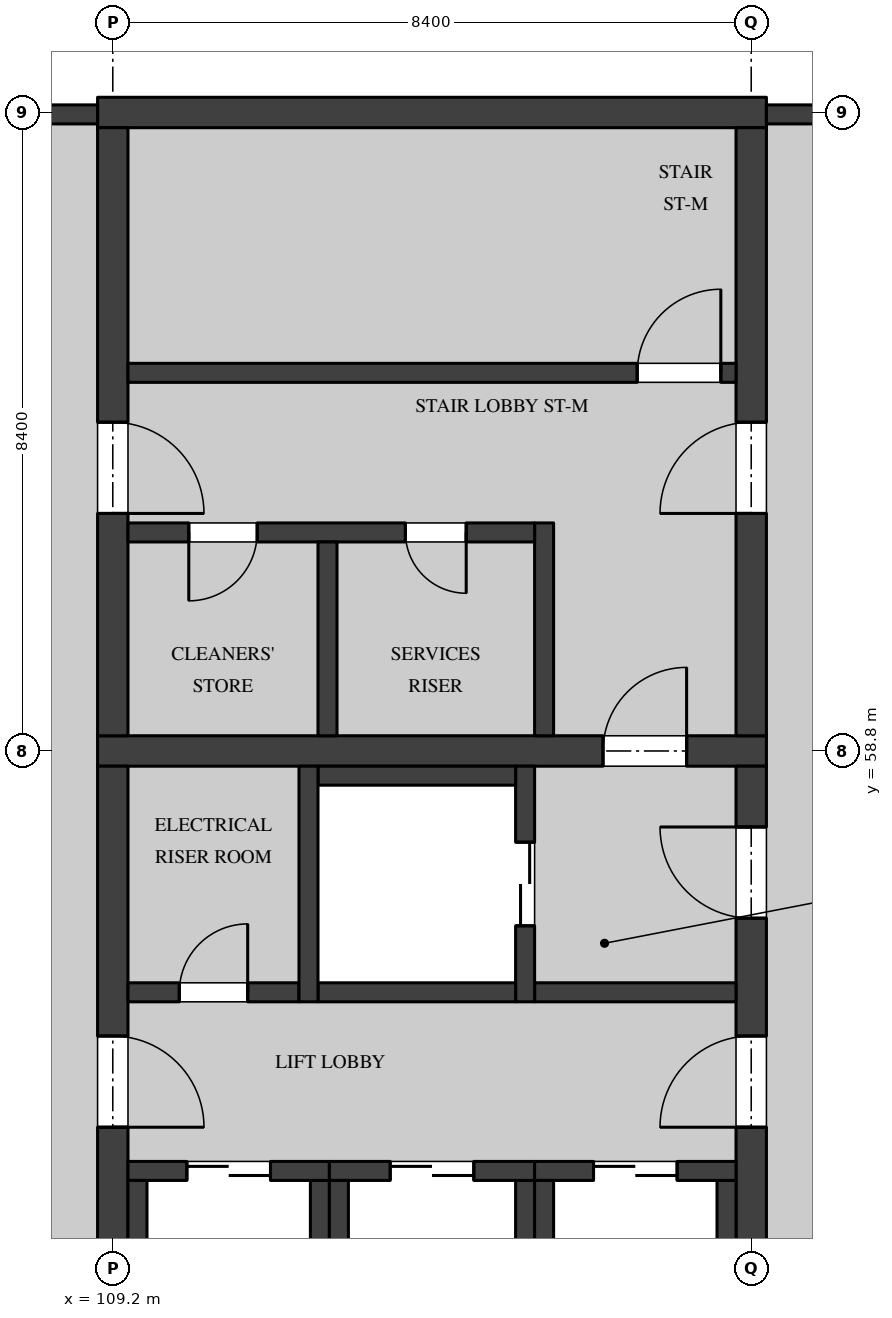
"""IFC4 building model, lengths in metres.
Left out: names, types, materials, properties, quantities, classifications, styles, units other than length and angle.
Written with IfcOpenShell. Run it as: python <this file> out.ifc"""

import sys

from ifc_helpers import new_model, si_unit, direction, frame, frame_2d, origin, place, context, subcontext, project, spatial, rectangle, extrude, element, fill, save


model = new_model("IFC4")
c1 = context("Model", 3, precision=1e-05, world=origin(), true_north=direction((0.0, 1.0)))
c2 = subcontext(c1, "Body", "Model", "MODEL_VIEW")
j1 = project(units=[si_unit("LENGTHUNIT", "METRE"), si_unit("PLANEANGLEUNIT", "RADIAN")], contexts=[c1])
p1 = place(None, origin())
s1 = spatial("IfcSite", under=j1, at=p1, CompositionType="ELEMENT")
p2 = place(p1, origin())
s2 = spatial("IfcBuilding", under=s1, at=p2, CompositionType="ELEMENT")
p3 = place(p2, frame((0.0, 0.0, 27.9)))
s3 = spatial("IfcBuildingStorey", under=s2, at=p3, CompositionType="ELEMENT", Elevation=27.9)
p4 = place(p3, frame((109.0, 58.8, 0.0), z_axis=(0.0, 0.0, 1.0), x_axis=(1.0, 0.0, 0.0)))
e1 = element("IfcWall", 1, at=p4, inside=s3, PredefinedType="SHEAR", context=c2, shape_type="SweptSolid", body=[
    extrude(rectangle(XDim=8.8, YDim=0.4, at=frame_2d((4.4, 0.0))), origin(), (0.0, 0.0, 1.0), 4.37),
])
p5 = place(p4, frame((6.65, 0.0, 0.0)))
e2 = element("IfcOpeningElement", 2, at=p5, cuts=e1, PredefinedType="OPENING", context=c2, shape_type="SweptSolid", body=[
    extrude(rectangle(XDim=1.1, YDim=2.1, at=frame_2d((0.55, 1.05))), frame((0.0, 0.21, 0.0), z_axis=(0.0, -1.0, 0.0), x_axis=(1.0, 0.0, 0.0)), (0.0, 0.0, 1.0), 0.42),
])
p6 = place(p3, frame((109.2, 50.6, 0.0), z_axis=(0.0, 0.0, 1.0), x_axis=(0.0, 1.0, 0.0)))
e3 = element("IfcWall", 3, at=p6, inside=s3, PredefinedType="SHEAR", context=c2, shape_type="SweptSolid", body=[
    extrude(rectangle(XDim=8.0, YDim=0.4, at=frame_2d((4.0, 0.0))), origin(), (0.0, 0.0, 1.0), 4.37),
])
p7 = place(p6, frame((3.25, 0.0, 0.0)))
e4 = element("IfcOpeningElement", 4, at=p7, cuts=e3, PredefinedType="OPENING", context=c2, shape_type="SweptSolid", body=[
    extrude(rectangle(XDim=1.2, YDim=2.1, at=frame_2d((0.6, 1.05))), frame((0.0, 0.21, 0.0), z_axis=(0.0, -1.0, 0.0), x_axis=(1.0, 0.0, 0.0)), (0.0, 0.0, 1.0), 0.42),
])
p8 = place(p3, frame((117.6, 50.6, 0.0), z_axis=(0.0, 0.0, 1.0), x_axis=(0.0, 1.0, 0.0)))
e5 = element("IfcWall", 5, at=p8, inside=s3, PredefinedType="SHEAR", context=c2, shape_type="SweptSolid", body=[
    extrude(rectangle(XDim=8.0, YDim=0.4, at=frame_2d((4.0, 0.0))), origin(), (0.0, 0.0, 1.0), 4.37),
])
p9 = place(p8, frame((3.25, 0.0, 0.0)))
e6 = element("IfcOpeningElement", 6, at=p9, cuts=e5, PredefinedType="OPENING", context=c2, shape_type="SweptSolid", body=[
    extrude(rectangle(XDim=1.2, YDim=2.1, at=frame_2d((0.6, 1.05))), frame((0.0, 0.21, 0.0), z_axis=(0.0, -1.0, 0.0), x_axis=(1.0, 0.0, 0.0)), (0.0, 0.0, 1.0), 0.42),
])
p10 = place(p8, frame((6.0, 0.0, 0.0)))
e7 = element("IfcOpeningElement", 7, at=p10, cuts=e5, PredefinedType="OPENING", context=c2, shape_type="SweptSolid", body=[
    extrude(rectangle(XDim=1.2, YDim=2.1, at=frame_2d((0.6, 1.05))), frame((0.0, 0.21, 0.0), z_axis=(0.0, -1.0, 0.0), x_axis=(1.0, 0.0, 0.0)), (0.0, 0.0, 1.0), 0.42),
])
p11 = place(p3, frame((109.4, 55.625, 0.0), z_axis=(0.0, 0.0, 1.0), x_axis=(1.0, 0.0, 0.0)))
e8 = element("IfcWall", 8, at=p11, inside=s3, PredefinedType="SOLIDWALL", context=c2, shape_type="SweptSolid", body=[
    extrude(rectangle(XDim=2.25, YDim=0.25, at=frame_2d((1.125, 0.0))), origin(), (0.0, 0.0, 1.0), 4.37),
])
p12 = place(p11, frame((0.675, 0.0, 0.0)))
e9 = element("IfcOpeningElement", 9, at=p12, cuts=e8, PredefinedType="OPENING", context=c2, shape_type="SweptSolid", body=[
    extrude(rectangle(XDim=0.9, YDim=2.1, at=frame_2d((0.45, 1.05))), frame((0.0, 0.135, 0.0), z_axis=(0.0, -1.0, 0.0), x_axis=(1.0, 0.0, 0.0)), (0.0, 0.0, 1.0), 0.27),
])
p13 = place(p3, frame((114.75, 55.625, 0.0), z_axis=(0.0, 0.0, 1.0), x_axis=(1.0, 0.0, 0.0)))
e10 = element("IfcWall", 10, at=p13, inside=s3, PredefinedType="SOLIDWALL", context=c2, shape_type="SweptSolid", body=[
    extrude(rectangle(XDim=2.65, YDim=0.25, at=frame_2d((1.325, 0.0))), origin(), (0.0, 0.0, 1.0), 4.37),
])
p14 = place(p3, frame((109.0, 67.2, 0.0), z_axis=(0.0, 0.0, 1.0), x_axis=(1.0, 0.0, 0.0)))
e11 = element("IfcWall", 11, at=p14, inside=s3, PredefinedType="SHEAR", context=c2, shape_type="SweptSolid", body=[
    extrude(rectangle(XDim=8.8, YDim=0.4, at=frame_2d((4.4, 0.0))), origin(), (0.0, 0.0, 1.0), 4.37),
])
p15 = place(p3, frame((109.2, 59.0, 0.0), z_axis=(0.0, 0.0, 1.0), x_axis=(0.0, 1.0, 0.0)))
e12 = element("IfcWall", 12, at=p15, inside=s3, PredefinedType="SHEAR", context=c2, shape_type="SweptSolid", body=[
    extrude(rectangle(XDim=8.0, YDim=0.4, at=frame_2d((4.0, 0.0))), origin(), (0.0, 0.0, 1.0), 4.37),
])
p16 = place(p15, frame((2.925, 0.0, 0.0)))
e13 = element("IfcOpeningElement", 13, at=p16, cuts=e12, PredefinedType="OPENING", context=c2, shape_type="SweptSolid", body=[
    extrude(rectangle(XDim=1.2, YDim=2.1, at=frame_2d((0.6, 1.05))), frame((0.0, 0.21, 0.0), z_axis=(0.0, -1.0, 0.0), x_axis=(1.0, 0.0, 0.0)), (0.0, 0.0, 1.0), 0.42),
])
p17 = place(p3, frame((117.6, 59.0, 0.0), z_axis=(0.0, 0.0, 1.0), x_axis=(0.0, 1.0, 0.0)))
e14 = element("IfcWall", 14, at=p17, inside=s3, PredefinedType="SHEAR", context=c2, shape_type="SweptSolid", body=[
    extrude(rectangle(XDim=8.0, YDim=0.4, at=frame_2d((4.0, 0.0))), origin(), (0.0, 0.0, 1.0), 4.37),
])
p18 = place(p17, frame((2.925, 0.0, 0.0)))
e15 = element("IfcOpeningElement", 15, at=p18, cuts=e14, PredefinedType="OPENING", context=c2, shape_type="SweptSolid", body=[
    extrude(rectangle(XDim=1.2, YDim=2.1, at=frame_2d((0.6, 1.05))), frame((0.0, 0.21, 0.0), z_axis=(0.0, -1.0, 0.0), x_axis=(1.0, 0.0, 0.0)), (0.0, 0.0, 1.0), 0.42),
])
p19 = place(p3, frame((117.4, 63.775, 0.0), z_axis=(0.0, 0.0, 1.0), x_axis=(-1.0, 0.0, 0.0)))
e16 = element("IfcWall", 16, at=p19, inside=s3, PredefinedType="SOLIDWALL", context=c2, shape_type="SweptSolid", body=[
    extrude(rectangle(XDim=8.0, YDim=0.25, at=frame_2d((4.0, 0.0))), origin(), (0.0, 0.0, 1.0), 4.37),
])
p20 = place(p19, frame((0.2, 0.0, 0.0)))
e17 = element("IfcOpeningElement", 17, at=p20, cuts=e16, PredefinedType="OPENING", context=c2, shape_type="SweptSolid", body=[
    extrude(rectangle(XDim=1.1, YDim=2.1, at=frame_2d((0.55, 1.05))), frame((0.0, 0.135, 0.0), z_axis=(0.0, -1.0, 0.0), x_axis=(1.0, 0.0, 0.0)), (0.0, 0.0, 1.0), 0.27),
])
p21 = place(p3, frame((114.875, 61.8, 0.0), z_axis=(0.0, 0.0, 1.0), x_axis=(0.0, -1.0, 0.0)))
e18 = element("IfcWall", 18, at=p21, inside=s3, PredefinedType="SOLIDWALL", context=c2, shape_type="SweptSolid", body=[
    extrude(rectangle(XDim=2.8, YDim=0.25, at=frame_2d((1.4, 0.0))), origin(), (0.0, 0.0, 1.0), 4.37),
])
p22 = place(p3, frame((114.75, 61.675, 0.0), z_axis=(0.0, 0.0, 1.0), x_axis=(-1.0, 0.0, 0.0)))
e19 = element("IfcWall", 19, at=p22, inside=s3, PredefinedType="SOLIDWALL", context=c2, shape_type="SweptSolid", body=[
    extrude(rectangle(XDim=5.35, YDim=0.25, at=frame_2d((2.675, 0.0))), origin(), (0.0, 0.0, 1.0), 4.37),
])
p23 = place(p22, frame((3.65, 0.0, 0.0)))
e20 = element("IfcOpeningElement", 20, at=p23, cuts=e19, PredefinedType="OPENING", context=c2, shape_type="SweptSolid", body=[
    extrude(rectangle(XDim=0.9, YDim=2.1, at=frame_2d((0.45, 1.05))), frame((0.0, 0.135, 0.0), z_axis=(0.0, -1.0, 0.0), x_axis=(1.0, 0.0, 0.0)), (0.0, 0.0, 1.0), 0.27),
])
p24 = place(p22, frame((0.9, 0.0, 0.0)))
e21 = element("IfcOpeningElement", 21, at=p24, cuts=e19, PredefinedType="OPENING", context=c2, shape_type="SweptSolid", body=[
    extrude(rectangle(XDim=0.8, YDim=2.1, at=frame_2d((0.4, 1.05))), frame((0.0, 0.135, 0.0), z_axis=(0.0, -1.0, 0.0), x_axis=(1.0, 0.0, 0.0)), (0.0, 0.0, 1.0), 0.27),
])
p25 = place(p3, frame((112.025, 61.55, 0.0), z_axis=(0.0, 0.0, 1.0), x_axis=(0.0, -1.0, 0.0)))
e22 = element("IfcWall", 22, at=p25, inside=s3, PredefinedType="SOLIDWALL", context=c2, shape_type="SweptSolid", body=[
    extrude(rectangle(XDim=2.55, YDim=0.25, at=frame_2d((1.275, 0.0))), origin(), (0.0, 0.0, 1.0), 4.37),
])
p26 = place(p3, frame((114.625, 55.5, 0.0), z_axis=(0.0, 0.0, 1.0), x_axis=(0.0, 1.0, 0.0)))
e23 = element("IfcWall", 23, at=p26, inside=s3, PredefinedType="SOLIDWALL", context=c2, shape_type="SweptSolid", body=[
    extrude(rectangle(XDim=3.1, YDim=0.25, at=frame_2d((1.55, 0.0))), origin(), (0.0, 0.0, 1.0), 4.37),
])
p27 = place(p26, frame((1.0, 0.0, 0.0)))
e24 = element("IfcOpeningElement", 24, at=p27, cuts=e23, PredefinedType="OPENING", context=c2, shape_type="SweptSolid", body=[
    extrude(rectangle(XDim=1.1, YDim=2.1, at=frame_2d((0.55, 1.05))), frame((0.0, 0.135, 0.0), z_axis=(0.0, -1.0, 0.0), x_axis=(1.0, 0.0, 0.0)), (0.0, 0.0, 1.0), 0.27),
])
for number, where, z_axis, x_axis in (
    (25, (111.9, 58.475, 0.0), (0.0, 0.0, 1.0), (1.0, 0.0, 0.0)),
    (26, (111.9, 55.625, 0.0), (0.0, 0.0, 1.0), (1.0, 0.0, 0.0)),
):
    element("IfcWall", number, at=place(p3, frame(where, z_axis=z_axis, x_axis=x_axis)), inside=s3, PredefinedType="SOLIDWALL", context=c2, shape_type="SweptSolid", body=[
        extrude(rectangle(XDim=2.6, YDim=0.25, at=frame_2d((1.3, 0.0))), origin(), (0.0, 0.0, 1.0), 4.37),
    ])
p28 = place(p3, frame((111.775, 55.5, 0.0), z_axis=(0.0, 0.0, 1.0), x_axis=(0.0, 1.0, 0.0)))
e27 = element("IfcWall", 27, at=p28, inside=s3, PredefinedType="SOLIDWALL", context=c2, shape_type="SweptSolid", body=[
    extrude(rectangle(XDim=3.1, YDim=0.25, at=frame_2d((1.55, 0.0))), origin(), (0.0, 0.0, 1.0), 4.37),
])
p29 = place(p3, frame((111.925, 50.85, 0.0), z_axis=(0.0, 0.0, 1.0), x_axis=(0.0, 1.0, 0.0)))
e28 = element("IfcWall", 28, at=p29, inside=s3, PredefinedType="SOLIDWALL", context=c2, shape_type="SweptSolid", body=[
    extrude(rectangle(XDim=2.3, YDim=0.25, at=frame_2d((1.15, 0.0))), origin(), (0.0, 0.0, 1.0), 4.37),
])
p30 = place(p3, frame((109.4, 53.275, 0.0), z_axis=(0.0, 0.0, 1.0), x_axis=(1.0, 0.0, 0.0)))
e29 = element("IfcWall", 29, at=p30, inside=s3, PredefinedType="SOLIDWALL", context=c2, shape_type="SweptSolid", body=[
    extrude(rectangle(XDim=2.65, YDim=0.25, at=frame_2d((1.325, 0.0))), origin(), (0.0, 0.0, 1.0), 4.37),
])
p31 = place(p30, frame((0.775, 0.0, 0.0)))
e30 = element("IfcOpeningElement", 30, at=p31, cuts=e29, PredefinedType="OPENING", context=c2, shape_type="SweptSolid", body=[
    extrude(rectangle(XDim=1.1, YDim=2.1, at=frame_2d((0.55, 1.05))), frame((0.0, 0.135, 0.0), z_axis=(0.0, -1.0, 0.0), x_axis=(1.0, 0.0, 0.0)), (0.0, 0.0, 1.0), 0.27),
])
for number, where, z_axis, x_axis in (
    (31, (109.525, 50.85, 0.0), (0.0, 0.0, 1.0), (0.0, 1.0, 0.0)),
    (32, (114.625, 50.85, 0.0), (0.0, 0.0, 1.0), (0.0, 1.0, 0.0)),
):
    element("IfcWall", number, at=place(p3, frame(where, z_axis=z_axis, x_axis=x_axis)), inside=s3, PredefinedType="SOLIDWALL", context=c2, shape_type="SweptSolid", body=[
        extrude(rectangle(XDim=2.3, YDim=0.25, at=frame_2d((1.15, 0.0))), origin(), (0.0, 0.0, 1.0), 4.37),
    ])
p32 = place(p3, frame((112.05, 53.275, 0.0), z_axis=(0.0, 0.0, 1.0), x_axis=(1.0, 0.0, 0.0)))
e33 = element("IfcWall", 33, at=p32, inside=s3, PredefinedType="SOLIDWALL", context=c2, shape_type="SweptSolid", body=[
    extrude(rectangle(XDim=2.7, YDim=0.25, at=frame_2d((1.35, 0.0))), origin(), (0.0, 0.0, 1.0), 4.37),
])
p33 = place(p32, frame((0.8, 0.0, 0.0)))
e34 = element("IfcOpeningElement", 34, at=p33, cuts=e33, PredefinedType="OPENING", context=c2, shape_type="SweptSolid", body=[
    extrude(rectangle(XDim=1.1, YDim=2.1, at=frame_2d((0.55, 1.05))), frame((0.0, 0.135, 0.0), z_axis=(0.0, -1.0, 0.0), x_axis=(1.0, 0.0, 0.0)), (0.0, 0.0, 1.0), 0.27),
])
for number, where, z_axis, x_axis in (
    (35, (112.175, 50.85, 0.0), (0.0, 0.0, 1.0), (0.0, 1.0, 0.0)),
    (36, (117.275, 50.85, 0.0), (0.0, 0.0, 1.0), (0.0, 1.0, 0.0)),
):
    element("IfcWall", number, at=place(p3, frame(where, z_axis=z_axis, x_axis=x_axis)), inside=s3, PredefinedType="SOLIDWALL", context=c2, shape_type="SweptSolid", body=[
        extrude(rectangle(XDim=2.3, YDim=0.25, at=frame_2d((1.15, 0.0))), origin(), (0.0, 0.0, 1.0), 4.37),
    ])
p34 = place(p3, frame((114.75, 53.275, 0.0), z_axis=(0.0, 0.0, 1.0), x_axis=(1.0, 0.0, 0.0)))
e37 = element("IfcWall", 37, at=p34, inside=s3, PredefinedType="SOLIDWALL", context=c2, shape_type="SweptSolid", body=[
    extrude(rectangle(XDim=2.65, YDim=0.25, at=frame_2d((1.325, 0.0))), origin(), (0.0, 0.0, 1.0), 4.37),
])
p35 = place(p34, frame((0.775, 0.0, 0.0)))
e38 = element("IfcOpeningElement", 38, at=p35, cuts=e37, PredefinedType="OPENING", context=c2, shape_type="SweptSolid", body=[
    extrude(rectangle(XDim=1.1, YDim=2.1, at=frame_2d((0.55, 1.05))), frame((0.0, 0.135, 0.0), z_axis=(0.0, -1.0, 0.0), x_axis=(1.0, 0.0, 0.0)), (0.0, 0.0, 1.0), 0.27),
])
p36 = place(p3, frame((114.875, 50.85, 0.0), z_axis=(0.0, 0.0, 1.0), x_axis=(0.0, 1.0, 0.0)))
e39 = element("IfcWall", 39, at=p36, inside=s3, PredefinedType="SOLIDWALL", context=c2, shape_type="SweptSolid", body=[
    extrude(rectangle(XDim=2.3, YDim=0.25, at=frame_2d((1.15, 0.0))), origin(), (0.0, 0.0, 1.0), 4.37),
])
p37 = place(p3, frame((125.996, 67.175, 0.0), z_axis=(0.0, 0.0, 1.0), x_axis=(-1.0, 0.0, 0.0)))
e40 = element("IfcWall", 40, at=p37, inside=s3, PredefinedType="SOLIDWALL", context=c2, shape_type="SweptSolid", body=[
    extrude(rectangle(XDim=8.196, YDim=0.25, at=frame_2d((4.098, 0.0))), origin(), (0.0, 0.0, 1.0), 3.746),
])
p38 = place(p3, frame((109.0, 67.175, 0.0), z_axis=(0.0, 0.0, 1.0), x_axis=(-1.0, 0.0, 0.0)))
e41 = element("IfcWall", 41, at=p38, inside=s3, PredefinedType="SOLIDWALL", context=c2, shape_type="SweptSolid", body=[
    extrude(rectangle(XDim=8.196, YDim=0.25, at=frame_2d((4.098, 0.0))), origin(), (0.0, 0.0, 1.0), 3.746),
])
p39 = place(p38, frame((4.9, 0.0, 0.9)))
e42 = element("IfcOpeningElement", 42, at=p39, cuts=e41, PredefinedType="OPENING", context=c2, shape_type="SweptSolid", body=[
    extrude(rectangle(XDim=2.4, YDim=2.25, at=frame_2d((1.2, 1.125))), frame((0.0, 0.135, 0.0), z_axis=(0.0, -1.0, 0.0), x_axis=(1.0, 0.0, 0.0)), (0.0, 0.0, 1.0), 0.27),
])
p40 = place(p7, frame((1.2, 0.0, 0.0), z_axis=(0.0, 0.0, 1.0), x_axis=(-1.0, 0.0, 0.0)))
e43 = element("IfcDoor", 43, at=p40, inside=s3, OperationType="SINGLE_SWING_LEFT", PredefinedType="DOOR", context=c2, shape_type="SweptSolid", body=[
    extrude(rectangle(XDim=1.2, YDim=2.1, at=frame_2d((0.6, 1.05))), frame((0.0, 0.035, 0.0), z_axis=(0.0, -1.0, 0.0), x_axis=(1.0, 0.0, 0.0)), (0.0, 0.0, 1.0), 0.07),
])
fill(e4, e43)
p41 = place(p9, origin())
e44 = element("IfcDoor", 44, at=p41, inside=s3, OperationType="SINGLE_SWING_RIGHT", PredefinedType="DOOR", context=c2, shape_type="SweptSolid", body=[
    extrude(rectangle(XDim=1.2, YDim=2.1, at=frame_2d((0.6, 1.05))), frame((0.0, 0.035, 0.0), z_axis=(0.0, -1.0, 0.0), x_axis=(1.0, 0.0, 0.0)), (0.0, 0.0, 1.0), 0.07),
])
fill(e6, e44)
p42 = place(p10, origin())
e45 = element("IfcDoor", 45, at=p42, inside=s3, OperationType="SINGLE_SWING_LEFT", PredefinedType="DOOR", context=c2, shape_type="SweptSolid", body=[
    extrude(rectangle(XDim=1.2, YDim=2.1, at=frame_2d((0.6, 1.05))), frame((0.0, 0.035, 0.0), z_axis=(0.0, -1.0, 0.0), x_axis=(1.0, 0.0, 0.0)), (0.0, 0.0, 1.0), 0.07),
])
fill(e7, e45)
p43 = place(p5, origin())
e46 = element("IfcDoor", 46, at=p43, inside=s3, OperationType="SINGLE_SWING_LEFT", PredefinedType="DOOR", context=c2, shape_type="SweptSolid", body=[
    extrude(rectangle(XDim=1.1, YDim=2.1, at=frame_2d((0.55, 1.05))), frame((0.0, 0.035, 0.0), z_axis=(0.0, -1.0, 0.0), x_axis=(1.0, 0.0, 0.0)), (0.0, 0.0, 1.0), 0.07),
])
fill(e2, e46)
p44 = place(p12, origin())
e47 = element("IfcDoor", 47, at=p44, inside=s3, OperationType="SINGLE_SWING_LEFT", PredefinedType="DOOR", context=c2, shape_type="SweptSolid", body=[
    extrude(rectangle(XDim=0.9, YDim=2.1, at=frame_2d((0.45, 1.05))), frame((0.0, 0.05, 0.0), z_axis=(0.0, -1.0, 0.0), x_axis=(1.0, 0.0, 0.0)), (0.0, 0.0, 1.0), 0.1),
])
fill(e9, e47)
p45 = place(p23, origin())
e48 = element("IfcDoor", 48, at=p45, inside=s3, OperationType="SINGLE_SWING_LEFT", PredefinedType="DOOR", context=c2, shape_type="SweptSolid", body=[
    extrude(rectangle(XDim=0.9, YDim=2.1, at=frame_2d((0.45, 1.05))), frame((0.0, 0.035, 0.0), z_axis=(0.0, -1.0, 0.0), x_axis=(1.0, 0.0, 0.0)), (0.0, 0.0, 1.0), 0.07),
])
fill(e20, e48)
p46 = place(p16, frame((1.2, 0.0, 0.0), z_axis=(0.0, 0.0, 1.0), x_axis=(-1.0, 0.0, 0.0)))
e49 = element("IfcDoor", 49, at=p46, inside=s3, OperationType="SINGLE_SWING_LEFT", PredefinedType="DOOR", context=c2, shape_type="SweptSolid", body=[
    extrude(rectangle(XDim=1.2, YDim=2.1, at=frame_2d((0.6, 1.05))), frame((0.0, 0.035, 0.0), z_axis=(0.0, -1.0, 0.0), x_axis=(1.0, 0.0, 0.0)), (0.0, 0.0, 1.0), 0.07),
])
fill(e13, e49)
p47 = place(p18, origin())
e50 = element("IfcDoor", 50, at=p47, inside=s3, OperationType="SINGLE_SWING_RIGHT", PredefinedType="DOOR", context=c2, shape_type="SweptSolid", body=[
    extrude(rectangle(XDim=1.2, YDim=2.1, at=frame_2d((0.6, 1.05))), frame((0.0, 0.035, 0.0), z_axis=(0.0, -1.0, 0.0), x_axis=(1.0, 0.0, 0.0)), (0.0, 0.0, 1.0), 0.07),
])
fill(e15, e50)
p48 = place(p24, origin())
e51 = element("IfcDoor", 51, at=p48, inside=s3, OperationType="SINGLE_SWING_RIGHT", PredefinedType="DOOR", context=c2, shape_type="SweptSolid", body=[
    extrude(rectangle(XDim=0.8, YDim=2.1, at=frame_2d((0.4, 1.05))), frame((0.0, 0.035, 0.0), z_axis=(0.0, -1.0, 0.0), x_axis=(1.0, 0.0, 0.0)), (0.0, 0.0, 1.0), 0.07),
])
fill(e21, e51)
p49 = place(p20, frame((1.1, 0.0, 0.0), z_axis=(0.0, 0.0, 1.0), x_axis=(-1.0, 0.0, 0.0)))
e52 = element("IfcDoor", 52, at=p49, inside=s3, OperationType="SINGLE_SWING_LEFT", PredefinedType="DOOR", context=c2, shape_type="SweptSolid", body=[
    extrude(rectangle(XDim=1.1, YDim=2.1, at=frame_2d((0.55, 1.05))), frame((0.0, 0.035, 0.0), z_axis=(0.0, -1.0, 0.0), x_axis=(1.0, 0.0, 0.0)), (0.0, 0.0, 1.0), 0.07),
])
fill(e17, e52)
p50 = place(p27, origin())
e53 = element("IfcDoor", 53, at=p50, inside=s3, OperationType="DOUBLE_DOOR_SLIDING", PredefinedType="DOOR", context=c2, shape_type="SweptSolid", body=[
    extrude(rectangle(XDim=1.1, YDim=2.1, at=frame_2d((0.55, 1.05))), frame((0.0, 0.04, 0.0), z_axis=(0.0, -1.0, 0.0), x_axis=(1.0, 0.0, 0.0)), (0.0, 0.0, 1.0), 0.08),
])
fill(e24, e53)
p51 = place(p31, origin())
e54 = element("IfcDoor", 54, at=p51, inside=s3, OperationType="DOUBLE_DOOR_SLIDING", PredefinedType="DOOR", context=c2, shape_type="SweptSolid", body=[
    extrude(rectangle(XDim=1.1, YDim=2.1, at=frame_2d((0.55, 1.05))), frame((0.0, 0.04, 0.0), z_axis=(0.0, -1.0, 0.0), x_axis=(1.0, 0.0, 0.0)), (0.0, 0.0, 1.0), 0.08),
])
fill(e30, e54)
p52 = place(p33, origin())
e55 = element("IfcDoor", 55, at=p52, inside=s3, OperationType="DOUBLE_DOOR_SLIDING", PredefinedType="DOOR", context=c2, shape_type="SweptSolid", body=[
    extrude(rectangle(XDim=1.1, YDim=2.1, at=frame_2d((0.55, 1.05))), frame((0.0, 0.04, 0.0), z_axis=(0.0, -1.0, 0.0), x_axis=(1.0, 0.0, 0.0)), (0.0, 0.0, 1.0), 0.08),
])
fill(e34, e55)
p53 = place(p35, origin())
e56 = element("IfcDoor", 56, at=p53, inside=s3, OperationType="DOUBLE_DOOR_SLIDING", PredefinedType="DOOR", context=c2, shape_type="SweptSolid", body=[
    extrude(rectangle(XDim=1.1, YDim=2.1, at=frame_2d((0.55, 1.05))), frame((0.0, 0.04, 0.0), z_axis=(0.0, -1.0, 0.0), x_axis=(1.0, 0.0, 0.0)), (0.0, 0.0, 1.0), 0.08),
])
fill(e38, e56)
save(model, sys.argv[1])
